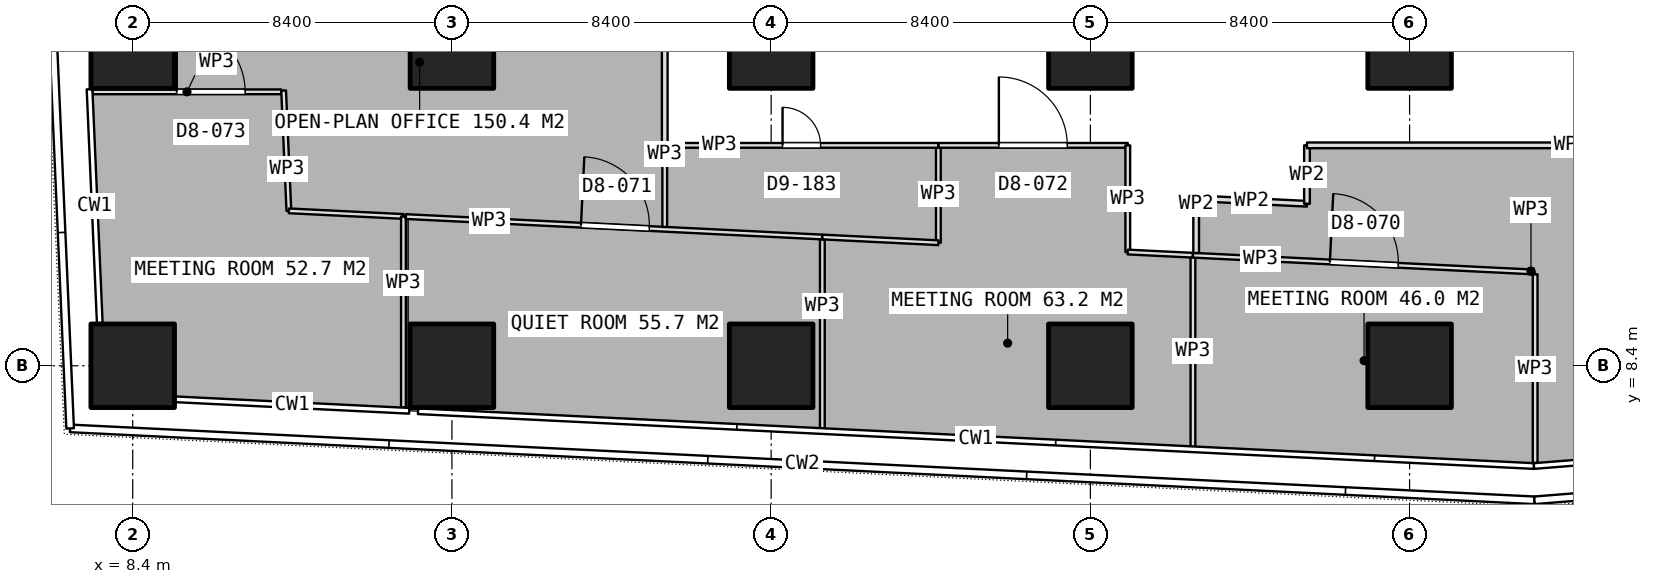
"""IFC4 building model, lengths in metres.
Left out: names, types, materials, properties, quantities, classifications, styles, units other than length and angle.
Written with IfcOpenShell. Run it as: python <this file> out.ifc"""

import sys

from ifc_helpers import new_model, si_unit, direction, frame, frame_2d, origin, origin_2d, place, context, subcontext, project, spatial, rectangle, extrude, element, fill, save


model = new_model("IFC4")
c1 = context("Model", 3, precision=1e-05, world=origin(), true_north=direction((0.0, 1.0)))
c2 = subcontext(c1, "Body", "Model", "MODEL_VIEW")
j1 = project(units=[si_unit("LENGTHUNIT", "METRE"), si_unit("PLANEANGLEUNIT", "RADIAN")], contexts=[c1])
p1 = place(None, origin())
s1 = spatial("IfcSite", under=j1, at=p1, CompositionType="ELEMENT")
p2 = place(p1, origin())
s2 = spatial("IfcBuilding", under=s1, at=p2, CompositionType="ELEMENT")
p3 = place(p2, frame((0.0, 0.0, 59.15)))
s3 = spatial("IfcBuildingStorey", under=s2, at=p3, CompositionType="ELEMENT", Elevation=59.15)
for number, where, z_axis, x_axis in (
    (1, (8.4, 8.4, 0.0), (0.0, 0.0, 1.0), (1.0, 0.0, 0.0)),
    (2, (8.4, 16.8, 0.0), (0.0, 0.0, 1.0), (1.0, 0.0, 0.0)),
    (3, (16.8, 8.4, 0.0), (0.0, 0.0, 1.0), (1.0, 0.0, 0.0)),
    (4, (16.8, 16.8, 0.0), (0.0, 0.0, 1.0), (1.0, 0.0, 0.0)),
    (5, (25.2, 8.4, 0.0), (0.0, 0.0, 1.0), (1.0, 0.0, 0.0)),
    (6, (25.2, 16.8, 0.0), (0.0, 0.0, 1.0), (1.0, 0.0, 0.0)),
    (7, (33.6, 8.4, 0.0), (0.0, 0.0, 1.0), (1.0, 0.0, 0.0)),
    (8, (33.6, 16.8, 0.0), (0.0, 0.0, 1.0), (1.0, 0.0, 0.0)),
    (9, (42.0, 8.4, 0.0), (0.0, 0.0, 1.0), (1.0, 0.0, 0.0)),
    (10, (42.0, 16.8, 0.0), (0.0, 0.0, 1.0), (1.0, 0.0, 0.0)),
):
    element("IfcColumn", number, at=place(p3, frame(where, z_axis=z_axis, x_axis=x_axis)), inside=s3, PredefinedType="COLUMN", context=c2, shape_type="SweptSolid", body=[
        extrude(rectangle(XDim=2.2, YDim=2.2, at=origin_2d()), origin(), (0.0, 0.0, 1.0), 3.75),
    ])
p4 = place(p3, frame((45.304, 10.806, 0.0), z_axis=(0.0, 0.0, 1.0), x_axis=(0.0, -1.0, 0.0)))
e11 = element("IfcWall", 11, at=p4, inside=s3, PredefinedType="PARTITIONING", context=c2, shape_type="SweptSolid", body=[
    extrude(rectangle(XDim=4.961, YDim=0.125, at=frame_2d((2.48, 0.0))), origin(), (0.0, 0.0, 1.0), 3.5),
])
p5 = place(p3, frame((36.299, 6.253, 0.0), z_axis=(0.0, 0.0, 1.0), x_axis=(0.0, 1.0, 0.0)))
e12 = element("IfcWall", 12, at=p5, inside=s3, PredefinedType="PARTITIONING", context=c2, shape_type="SweptSolid", body=[
    extrude(rectangle(XDim=5.056, YDim=0.125, at=frame_2d((2.528, 0.0))), origin(), (0.0, 0.0, 1.0), 3.5),
])
p6 = place(p3, frame((36.299, 11.309, 0.0), z_axis=(0.0, 0.0, 1.0), x_axis=(0.998795041163, -0.049076121979, 0.0)))
e13 = element("IfcWall", 13, at=p6, inside=s3, PredefinedType="PARTITIONING", context=c2, shape_type="SweptSolid", body=[
    extrude(rectangle(XDim=8.905, YDim=0.125, at=frame_2d((4.452, 0.0))), origin(), (0.0, 0.0, 1.0), 3.5),
])
p7 = place(p6, frame((3.608, 0.0, 0.0)))
e14 = element("IfcOpeningElement", 14, at=p7, cuts=e13, PredefinedType="OPENING", context=c2, shape_type="SweptSolid", body=[
    extrude(rectangle(XDim=1.8, YDim=2.1, at=frame_2d((0.9, 1.05))), frame((0.0, 0.073, 0.0), z_axis=(0.0, -1.0, 0.0), x_axis=(1.0, 0.0, 0.0)), (0.0, 0.0, 1.0), 0.145),
])
p8 = place(p3, frame((7.347, 15.608, 0.0), z_axis=(0.0, 0.0, 1.0), x_axis=(1.0, 0.0, 0.0)))
e15 = element("IfcWall", 15, at=p8, inside=s3, PredefinedType="PARTITIONING", context=c2, shape_type="SweptSolid", body=[
    extrude(rectangle(XDim=4.963, YDim=0.125, at=frame_2d((2.481, 0.0))), origin(), (0.0, 0.0, 1.0), 3.5),
])
p9 = place(p8, frame((2.212, 0.0, 0.0)))
e16 = element("IfcOpeningElement", 16, at=p9, cuts=e15, PredefinedType="OPENING", context=c2, shape_type="SweptSolid", body=[
    extrude(rectangle(XDim=1.8, YDim=2.1, at=frame_2d((0.9, 1.05))), frame((0.0, 0.073, 0.0), z_axis=(0.0, -1.0, 0.0), x_axis=(1.0, 0.0, 0.0)), (0.0, 0.0, 1.0), 0.145),
])
p10 = place(p3, frame((12.371, 15.643, 0.0), z_axis=(0.0, 0.0, 1.0), x_axis=(0.043527491497, -0.999052229608, 0.0)))
e17 = element("IfcWall", 17, at=p10, inside=s3, PredefinedType="PARTITIONING", context=c2, shape_type="SweptSolid", body=[
    extrude(rectangle(XDim=3.169, YDim=0.125, at=frame_2d((1.584, 0.0))), origin(), (0.0, 0.0, 1.0), 3.5),
])
p11 = place(p3, frame((12.509, 12.477, 0.0), z_axis=(0.0, 0.0, 1.0), x_axis=(0.9987981005, -0.049013818844, 0.0)))
e18 = element("IfcWall", 18, at=p11, inside=s3, PredefinedType="PARTITIONING", context=c2, shape_type="SweptSolid", body=[
    extrude(rectangle(XDim=3.019, YDim=0.125, at=frame_2d((1.509, 0.0))), origin(), (0.0, 0.0, 1.0), 3.5),
])
p12 = place(p3, frame((15.524, 12.329, 0.0), z_axis=(0.0, 0.0, 1.0), x_axis=(0.0, -1.0, 0.0)))
e19 = element("IfcWall", 19, at=p12, inside=s3, PredefinedType="PARTITIONING", context=c2, shape_type="SweptSolid", body=[
    extrude(rectangle(XDim=5.026, YDim=0.125, at=frame_2d((2.513, 0.0))), origin(), (0.0, 0.0, 1.0), 3.5),
])
p13 = place(p3, frame((15.586, 12.326, 0.0), z_axis=(0.0, 0.0, 1.0), x_axis=(0.998798341691, -0.04900890364, 0.0)))
e20 = element("IfcWall", 20, at=p13, inside=s3, PredefinedType="PARTITIONING", context=c2, shape_type="SweptSolid", body=[
    extrude(rectangle(XDim=10.974, YDim=0.125, at=frame_2d((5.487, 0.0))), origin(), (0.0, 0.0, 1.0), 3.5),
])
p14 = place(p13, frame((4.615, 0.0, 0.0)))
e21 = element("IfcOpeningElement", 21, at=p14, cuts=e20, PredefinedType="OPENING", context=c2, shape_type="SweptSolid", body=[
    extrude(rectangle(XDim=1.8, YDim=2.1, at=frame_2d((0.9, 1.05))), frame((0.0, 0.073, 0.0), z_axis=(0.0, -1.0, 0.0), x_axis=(1.0, 0.0, 0.0)), (0.0, 0.0, 1.0), 0.145),
])
p15 = place(p3, frame((26.547, 11.725, 0.0), z_axis=(0.0, 0.0, 1.0), x_axis=(0.0, -1.0, 0.0)))
e22 = element("IfcWall", 22, at=p15, inside=s3, PredefinedType="PARTITIONING", context=c2, shape_type="SweptSolid", body=[
    extrude(rectangle(XDim=4.993, YDim=0.125, at=frame_2d((2.497, 0.0))), origin(), (0.0, 0.0, 1.0), 3.5),
])
p16 = place(p3, frame((29.6, 11.638, 0.0), z_axis=(0.0, 0.0, 1.0), x_axis=(0.0, 1.0, 0.0)))
e23 = element("IfcWall", 23, at=p16, inside=s3, PredefinedType="PARTITIONING", context=c2, shape_type="SweptSolid", body=[
    extrude(rectangle(XDim=2.562, YDim=0.125, at=frame_2d((1.281, 0.0))), origin(), (0.0, 0.0, 1.0), 3.5),
])
p17 = place(p3, frame((29.6, 14.2, 0.0), z_axis=(0.0, 0.0, 1.0), x_axis=(1.0, 0.0, 0.0)))
e24 = element("IfcWall", 24, at=p17, inside=s3, PredefinedType="PARTITIONING", context=c2, shape_type="SweptSolid", body=[
    extrude(rectangle(XDim=4.984, YDim=0.125, at=frame_2d((2.492, 0.0))), origin(), (0.0, 0.0, 1.0), 3.5),
])
p18 = place(p17, frame((1.592, 0.0, 0.0)))
e25 = element("IfcOpeningElement", 25, at=p18, cuts=e24, PredefinedType="OPENING", context=c2, shape_type="SweptSolid", body=[
    extrude(rectangle(XDim=1.8, YDim=2.1, at=frame_2d((0.9, 1.05))), frame((0.0, 0.073, 0.0), z_axis=(0.0, -1.0, 0.0), x_axis=(1.0, 0.0, 0.0)), (0.0, 0.0, 1.0), 0.145),
])
p19 = place(p3, frame((34.584, 14.2, 0.0), z_axis=(0.0, 0.0, 1.0), x_axis=(0.0, -1.0, 0.0)))
e26 = element("IfcWall", 26, at=p19, inside=s3, PredefinedType="PARTITIONING", context=c2, shape_type="SweptSolid", body=[
    extrude(rectangle(XDim=2.807, YDim=0.125, at=frame_2d((1.403, 0.0))), origin(), (0.0, 0.0, 1.0), 3.5),
])
p20 = place(p3, frame((34.584, 11.393, 0.0), z_axis=(0.0, 0.0, 1.0), x_axis=(0.998801859142, -0.048937165581, 0.0)))
e27 = element("IfcWall", 27, at=p20, inside=s3, PredefinedType="PARTITIONING", context=c2, shape_type="SweptSolid", body=[
    extrude(rectangle(XDim=1.716, YDim=0.125, at=frame_2d((0.858, 0.0))), origin(), (0.0, 0.0, 1.0), 3.5),
])
p21 = place(p3, frame((26.548, 11.788, 0.0), z_axis=(0.0, 0.0, 1.0), x_axis=(0.998792065816, -0.049136638707, 0.0)))
e28 = element("IfcWall", 28, at=p21, inside=s3, PredefinedType="PARTITIONING", context=c2, shape_type="SweptSolid", body=[
    extrude(rectangle(XDim=3.056, YDim=0.125, at=frame_2d((1.528, 0.0))), origin(), (0.0, 0.0, 1.0), 3.5),
])
p22 = place(p3, frame((22.4, 12.054, 0.0), z_axis=(0.0, 0.0, 1.0), x_axis=(0.0, 1.0, 0.0)))
e29 = element("IfcWall", 29, at=p22, inside=s3, PredefinedType="PARTITIONING", context=c2, shape_type="SweptSolid", body=[
    extrude(rectangle(XDim=2.146, YDim=0.125, at=frame_2d((1.073, 0.0))), origin(), (0.0, 0.0, 1.0), 3.5),
])
p23 = place(p3, frame((22.4, 14.2, 0.0), z_axis=(0.0, 0.0, 1.0), x_axis=(1.0, 0.0, 0.0)))
e30 = element("IfcWall", 30, at=p23, inside=s3, PredefinedType="PARTITIONING", context=c2, shape_type="SweptSolid", body=[
    extrude(rectangle(XDim=7.2, YDim=0.125, at=frame_2d((3.6, 0.0))), origin(), (0.0, 0.0, 1.0), 3.5),
])
p24 = place(p23, frame((3.1, 0.0, 0.0)))
e31 = element("IfcOpeningElement", 31, at=p24, cuts=e30, PredefinedType="OPENING", context=c2, shape_type="SweptSolid", body=[
    extrude(rectangle(XDim=1.0, YDim=2.1, at=frame_2d((0.5, 1.05))), frame((0.0, 0.073, 0.0), z_axis=(0.0, -1.0, 0.0), x_axis=(1.0, 0.0, 0.0)), (0.0, 0.0, 1.0), 0.145),
])
p25 = place(p3, frame((36.384, 11.367, 0.0), z_axis=(0.0, 0.0, 1.0), x_axis=(0.0, 1.0, 0.0)))
e32 = element("IfcWall", 32, at=p25, inside=s3, PredefinedType="PARTITIONING", context=c2, shape_type="SweptSolid", body=[
    extrude(rectangle(XDim=1.439, YDim=0.15, at=frame_2d((0.719, 0.0))), origin(), (0.0, 0.0, 1.0), 3.5),
])
p26 = place(p3, frame((36.384, 12.806, 0.0), z_axis=(0.0, 0.0, 1.0), x_axis=(0.99880270372, -0.048919924789, 0.0)))
e33 = element("IfcWall", 33, at=p26, inside=s3, PredefinedType="PARTITIONING", context=c2, shape_type="SweptSolid", body=[
    extrude(rectangle(XDim=2.919, YDim=0.15, at=frame_2d((1.46, 0.0))), origin(), (0.0, 0.0, 1.0), 3.5),
])
p27 = place(p3, frame((39.3, 12.663, 0.0), z_axis=(0.0, 0.0, 1.0), x_axis=(0.0, 1.0, 0.0)))
e34 = element("IfcWall", 34, at=p27, inside=s3, PredefinedType="PARTITIONING", context=c2, shape_type="SweptSolid", body=[
    extrude(rectangle(XDim=1.537, YDim=0.15, at=frame_2d((0.769, 0.0))), origin(), (0.0, 0.0, 1.0), 3.5),
])
p28 = place(p3, frame((39.3, 14.2, 0.0), z_axis=(0.0, 0.0, 1.0), x_axis=(1.0, 0.0, 0.0)))
e35 = element("IfcWall", 35, at=p28, inside=s3, PredefinedType="PARTITIONING", context=c2, shape_type="SweptSolid", body=[
    extrude(rectangle(XDim=13.9, YDim=0.15, at=frame_2d((6.95, 0.0))), origin(), (0.0, 0.0, 1.0), 3.5),
])
p29 = place(p3, frame((22.4, 26.512, 0.0), z_axis=(0.0, 0.0, 1.0), x_axis=(0.0, -1.0, 0.0)))
e36 = element("IfcWall", 36, at=p29, inside=s3, PredefinedType="PARTITIONING", context=c2, shape_type="SweptSolid", body=[
    extrude(rectangle(XDim=12.312, YDim=0.15, at=frame_2d((6.156, 0.0))), origin(), (0.0, 0.0, 1.0), 3.5),
])
p30 = place(p29, frame((5.656, 0.0, 0.0)))
e37 = element("IfcOpeningElement", 37, at=p30, cuts=e36, PredefinedType="OPENING", context=c2, shape_type="SweptSolid", body=[
    extrude(rectangle(XDim=1.0, YDim=2.1, at=frame_2d((0.5, 1.05))), frame((0.0, 0.085, 0.0), z_axis=(0.0, -1.0, 0.0), x_axis=(1.0, 0.0, 0.0)), (0.0, 0.0, 1.0), 0.17),
])
p31 = place(p3, frame((45.19, 10.81, 0.0), z_axis=(0.0, 0.0, 1.0), x_axis=(0.050013205413, 0.998748556587, 0.0)))
e38 = element("IfcWall", 38, at=p31, inside=s3, PredefinedType="PARTITIONING", context=c2, shape_type="SweptSolid", body=[
    extrude(rectangle(XDim=0.161, YDim=0.125, at=frame_2d((0.081, 0.0))), origin(), (0.0, 0.0, 1.0), 3.5),
])
p32 = place(p7, origin())
e39 = element("IfcDoor", 39, at=p32, inside=s3, OperationType="DOUBLE_DOOR_SINGLE_SWING", PredefinedType="DOOR", context=c2, shape_type="SweptSolid", body=[
    extrude(rectangle(XDim=1.8, YDim=2.1, at=frame_2d((0.9, 1.05))), frame((0.0, 0.025, 0.0), z_axis=(0.0, -1.0, 0.0), x_axis=(1.0, 0.0, 0.0)), (0.0, 0.0, 1.0), 0.05),
])
fill(e14, e39)
p33 = place(p9, origin())
e40 = element("IfcDoor", 40, at=p33, inside=s3, OperationType="DOUBLE_DOOR_SINGLE_SWING", PredefinedType="DOOR", context=c2, shape_type="SweptSolid", body=[
    extrude(rectangle(XDim=1.8, YDim=2.1, at=frame_2d((0.9, 1.05))), frame((0.0, 0.025, 0.0), z_axis=(0.0, -1.0, 0.0), x_axis=(1.0, 0.0, 0.0)), (0.0, 0.0, 1.0), 0.05),
])
fill(e16, e40)
p34 = place(p14, origin())
e41 = element("IfcDoor", 41, at=p34, inside=s3, OperationType="DOUBLE_DOOR_SINGLE_SWING", PredefinedType="DOOR", context=c2, shape_type="SweptSolid", body=[
    extrude(rectangle(XDim=1.8, YDim=2.1, at=frame_2d((0.9, 1.05))), frame((0.0, 0.025, 0.0), z_axis=(0.0, -1.0, 0.0), x_axis=(1.0, 0.0, 0.0)), (0.0, 0.0, 1.0), 0.05),
])
fill(e21, e41)
p35 = place(p18, origin())
e42 = element("IfcDoor", 42, at=p35, inside=s3, OperationType="DOUBLE_DOOR_SINGLE_SWING", PredefinedType="DOOR", context=c2, shape_type="SweptSolid", body=[
    extrude(rectangle(XDim=1.8, YDim=2.1, at=frame_2d((0.9, 1.05))), frame((0.0, 0.025, 0.0), z_axis=(0.0, -1.0, 0.0), x_axis=(1.0, 0.0, 0.0)), (0.0, 0.0, 1.0), 0.05),
])
fill(e25, e42)
p36 = place(p24, origin())
e43 = element("IfcDoor", 43, at=p36, inside=s3, OperationType="SINGLE_SWING_LEFT", PredefinedType="DOOR", context=c2, shape_type="SweptSolid", body=[
    extrude(rectangle(XDim=1.0, YDim=2.1, at=frame_2d((0.5, 1.05))), frame((0.0, 0.025, 0.0), z_axis=(0.0, -1.0, 0.0), x_axis=(1.0, 0.0, 0.0)), (0.0, 0.0, 1.0), 0.05),
])
fill(e31, e43)
save(model, sys.argv[1])
